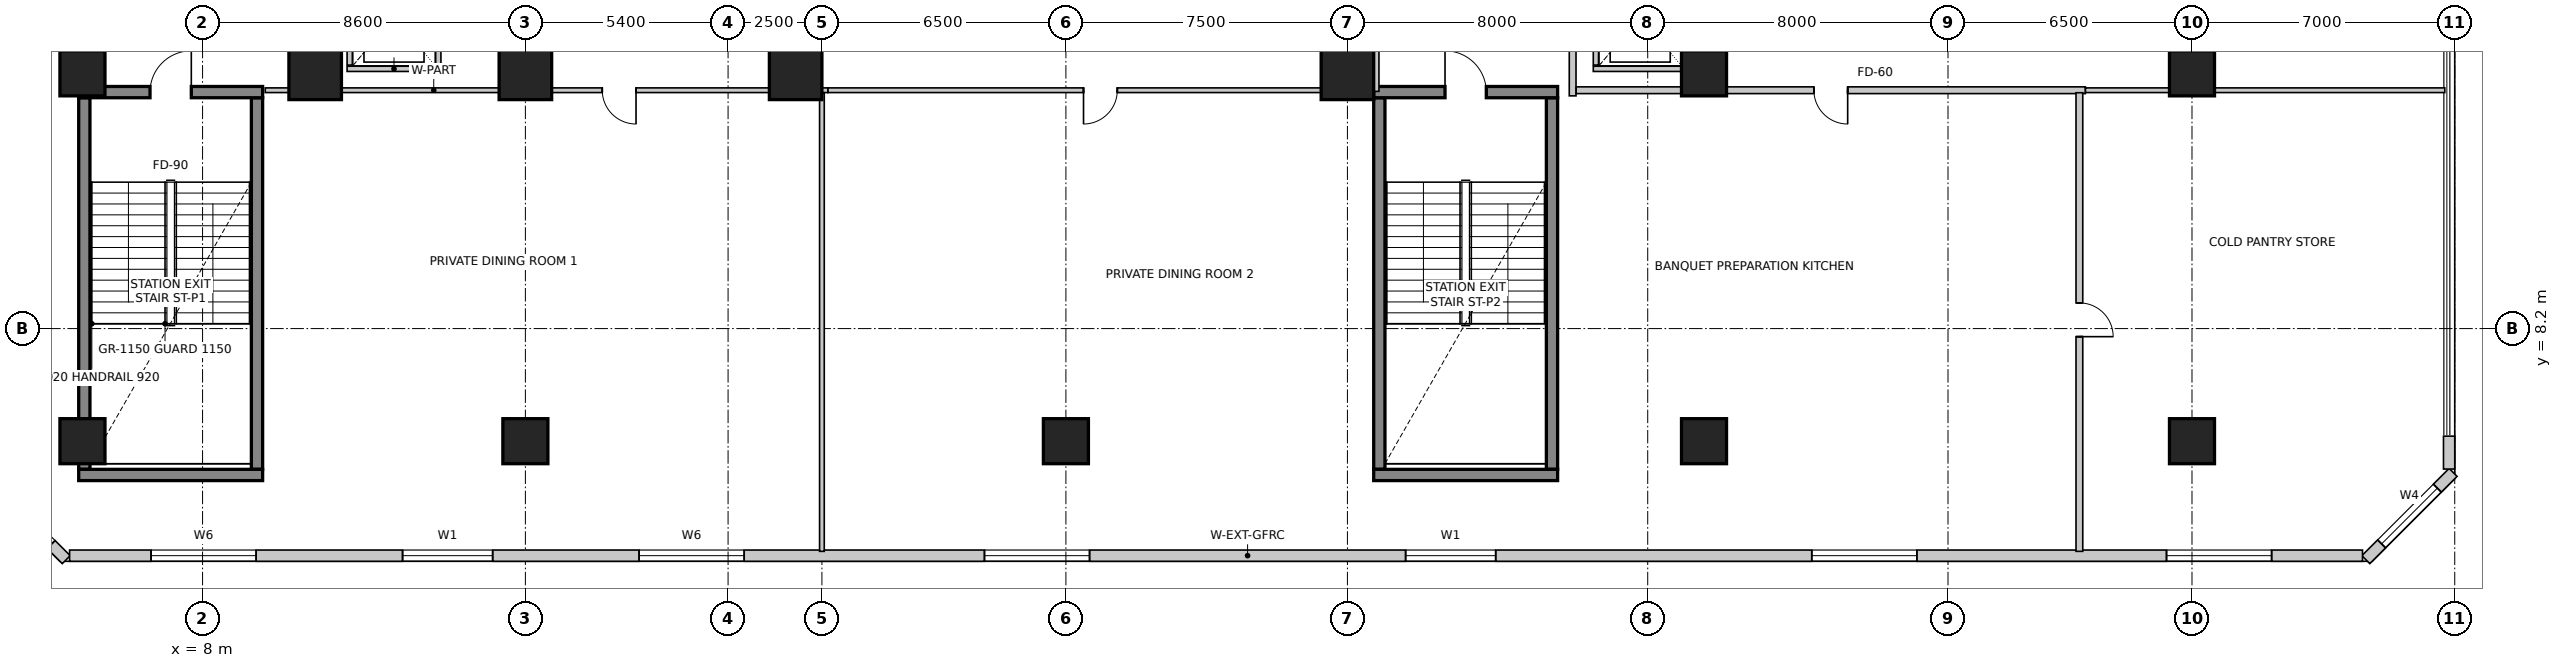
"""IFC4 building model, lengths in metres.
Left out: names, types, materials, properties, quantities, classifications, styles, units other than length and angle.
Written with IfcOpenShell. Run it as: python <this file> out.ifc"""

import sys

from ifc_helpers import new_model, si_unit, direction, frame, frame_2d, origin, origin_2d, place, context, subcontext, project, spatial, rectangle, extrude, source, transform, mapped, element, fill, save


model = new_model("IFC4")
c1 = context("Model", 3, precision=1e-05, world=origin(), true_north=direction((0.0, 1.0)))
c2 = subcontext(c1, "Body", "Model", "MODEL_VIEW")
j1 = project(units=[si_unit("LENGTHUNIT", "METRE"), si_unit("PLANEANGLEUNIT", "RADIAN")], contexts=[c1])
p1 = place(None, origin())
s1 = spatial("IfcSite", under=j1, at=p1, CompositionType="ELEMENT")
p2 = place(p1, origin())
s2 = spatial("IfcBuilding", under=s1, at=p2, CompositionType="ELEMENT")
p3 = place(p2, frame((0.0, 0.0, 16.4)))
s3 = spatial("IfcBuildingStorey", under=s2, at=p3, CompositionType="ELEMENT", Elevation=16.4)
for number, where, z_axis, x_axis in (
    (1, (4.85, 4.45, 0.0), (0.0, 0.0, 1.0), (0.0, 1.0, 0.0)),
    (2, (9.45, 4.45, 0.0), (0.0, 0.0, 1.0), (0.0, 1.0, 0.0)),
):
    element("IfcWall", number, at=place(p3, frame(where, z_axis=z_axis, x_axis=x_axis)), inside=s3, PredefinedType="SHEAR", context=c2, shape_type="SweptSolid", body=[
        extrude(rectangle(XDim=9.9, YDim=0.3, at=frame_2d((4.95, 0.0))), origin(), (0.0, 0.0, 1.0), 5.2),
    ])
p4 = place(p3, frame((4.7, 4.3, 0.0), z_axis=(0.0, 0.0, 1.0), x_axis=(1.0, 0.0, 0.0)))
e3 = element("IfcWall", 3, at=p4, inside=s3, PredefinedType="SHEAR", context=c2, shape_type="SweptSolid", body=[
    extrude(rectangle(XDim=4.9, YDim=0.3, at=frame_2d((2.45, 0.0))), origin(), (0.0, 0.0, 1.0), 5.2),
])
p5 = place(p3, frame((4.7, 14.5, 0.0), z_axis=(0.0, 0.0, 1.0), x_axis=(1.0, 0.0, 0.0)))
e4 = element("IfcWall", 4, at=p5, inside=s3, PredefinedType="SHEAR", context=c2, shape_type="SweptSolid", body=[
    extrude(rectangle(XDim=4.9, YDim=0.3, at=frame_2d((2.45, 0.0))), origin(), (0.0, 0.0, 1.0), 5.2),
])
m1 = source(origin(), c2, "Body", "SweptSolid", [
    extrude(rectangle(XDim=1.1, YDim=2.15, at=frame_2d((0.55, 1.075))), frame((0.0, 0.16, 0.0), z_axis=(0.0, -1.0, 0.0), x_axis=(1.0, 0.0, 0.0)), (0.0, 0.0, 1.0), 0.32),
])
p6 = place(p5, frame((1.9, 0.0, 0.0)))
e5 = element("IfcOpeningElement", 5, at=p6, cuts=e4, PredefinedType="OPENING", context=c2, shape_type="MappedRepresentation", body=[
    mapped(m1, transform((0.0, 0.0, 0.0), scale=1.0)),
])
for number, where, z_axis, x_axis in (
    (6, (39.35, 4.45, 0.0), (0.0, 0.0, 1.0), (0.0, 1.0, 0.0)),
    (7, (43.95, 4.45, 0.0), (0.0, 0.0, 1.0), (0.0, 1.0, 0.0)),
):
    element("IfcWall", number, at=place(p3, frame(where, z_axis=z_axis, x_axis=x_axis)), inside=s3, PredefinedType="SHEAR", context=c2, shape_type="SweptSolid", body=[
        extrude(rectangle(XDim=9.9, YDim=0.3, at=frame_2d((4.95, 0.0))), origin(), (0.0, 0.0, 1.0), 5.2),
    ])
p7 = place(p3, frame((39.2, 4.3, 0.0), z_axis=(0.0, 0.0, 1.0), x_axis=(1.0, 0.0, 0.0)))
e8 = element("IfcWall", 8, at=p7, inside=s3, PredefinedType="SHEAR", context=c2, shape_type="SweptSolid", body=[
    extrude(rectangle(XDim=4.9, YDim=0.3, at=frame_2d((2.45, 0.0))), origin(), (0.0, 0.0, 1.0), 5.2),
])
p8 = place(p3, frame((39.2, 14.5, 0.0), z_axis=(0.0, 0.0, 1.0), x_axis=(1.0, 0.0, 0.0)))
e9 = element("IfcWall", 9, at=p8, inside=s3, PredefinedType="SHEAR", context=c2, shape_type="SweptSolid", body=[
    extrude(rectangle(XDim=4.9, YDim=0.3, at=frame_2d((2.45, 0.0))), origin(), (0.0, 0.0, 1.0), 5.2),
])
p9 = place(p8, frame((1.9, 0.0, 0.0)))
e10 = element("IfcOpeningElement", 10, at=p9, cuts=e9, PredefinedType="OPENING", context=c2, shape_type="MappedRepresentation", body=[
    mapped(m1, transform((0.0, 0.0, 0.0), scale=1.0)),
])
m2 = source(origin(), c2, "Body", "SweptSolid", [
    extrude(rectangle(XDim=1.2, YDim=1.2, at=origin_2d()), origin(), (0.0, 0.0, 1.0), 5.2),
])
for number, where, z_axis, x_axis in (
    (11, (4.8, 5.2, 0.0), (0.0, 0.0, 1.0), (1.0, 0.0, 0.0)),
    (12, (16.6, 5.2, 0.0), (0.0, 0.0, 1.0), (1.0, 0.0, 0.0)),
    (13, (31.0, 5.2, 0.0), (0.0, 0.0, 1.0), (1.0, 0.0, 0.0)),
    (14, (48.0, 5.2, 0.0), (0.0, 0.0, 1.0), (1.0, 0.0, 0.0)),
    (15, (61.0, 5.2, 0.0), (0.0, 0.0, 1.0), (1.0, 0.0, 0.0)),
    (16, (4.8, 15.0, 0.0), (0.0, 0.0, 1.0), (1.0, 0.0, 0.0)),
):
    element("IfcColumn", number, at=place(p3, frame(where, z_axis=z_axis, x_axis=x_axis)), inside=s3, PredefinedType="COLUMN", context=c2, shape_type="MappedRepresentation", body=[
        mapped(m2, transform((0.0, 0.0, 0.0), scale=1.0)),
    ])
m3 = source(origin(), c2, "Body", "SweptSolid", [
    extrude(rectangle(XDim=1.4, YDim=1.4, at=origin_2d()), origin(), (0.0, 0.0, 1.0), 5.2),
])
for number, where, z_axis, x_axis in (
    (17, (11.0, 15.0, 0.0), (0.0, 0.0, 1.0), (1.0, 0.0, 0.0)),
    (18, (16.6, 15.0, 0.0), (0.0, 0.0, 1.0), (1.0, 0.0, 0.0)),
    (19, (23.8, 15.0, 0.0), (0.0, 0.0, 1.0), (1.0, 0.0, 0.0)),
    (20, (38.5, 15.0, 0.0), (0.0, 0.0, 1.0), (1.0, 0.0, 0.0)),
):
    element("IfcColumn", number, at=place(p3, frame(where, z_axis=z_axis, x_axis=x_axis)), inside=s3, PredefinedType="COLUMN", context=c2, shape_type="MappedRepresentation", body=[
        mapped(m3, transform((0.0, 0.0, 0.0), scale=1.0)),
    ])
for number, where, z_axis, x_axis in (
    (21, (48.0, 15.0, 0.0), (0.0, 0.0, 1.0), (1.0, 0.0, 0.0)),
    (22, (61.0, 15.0, 0.0), (0.0, 0.0, 1.0), (1.0, 0.0, 0.0)),
):
    element("IfcColumn", number, at=place(p3, frame(where, z_axis=z_axis, x_axis=x_axis)), inside=s3, PredefinedType="COLUMN", context=c2, shape_type="MappedRepresentation", body=[
        mapped(m2, transform((0.0, 0.0, 0.0), scale=1.0)),
    ])
p10 = place(p3, frame((65.632, 2.044, 0.0), z_axis=(0.0, 0.0, 1.0), x_axis=(0.707106781187, 0.707106781187, 0.0)))
e23 = element("IfcWall", 23, at=p10, inside=s3, PredefinedType="SOLIDWALL", context=c2, shape_type="SweptSolid", body=[
    extrude(rectangle(XDim=3.287, YDim=0.3, at=frame_2d((1.644, 0.0))), origin(), (0.0, 0.0, 1.0), 4.85),
])
m4 = source(origin(), c2, "Body", "SweptSolid", [
    extrude(rectangle(XDim=2.1, YDim=2.0, at=frame_2d((1.05, 1.0))), frame((0.0, 0.16, 0.0), z_axis=(0.0, -1.0, 0.0), x_axis=(1.0, 0.0, 0.0)), (0.0, 0.0, 1.0), 0.32),
])
p11 = place(p10, frame((0.594, 0.0, 0.85)))
e24 = element("IfcOpeningElement", 24, at=p11, cuts=e23, PredefinedType="OPENING", context=c2, shape_type="MappedRepresentation", body=[
    mapped(m4, transform((0.0, 0.0, 0.0), scale=1.0)),
])
p12 = place(p3, frame((67.85, 4.457, 0.0), z_axis=(0.0, 0.0, 1.0), x_axis=(0.0, 1.0, 0.0)))
e25 = element("IfcWall", 25, at=p12, inside=s3, PredefinedType="SOLIDWALL", context=c2, shape_type="SweptSolid", body=[
    extrude(rectangle(XDim=0.877, YDim=0.3, at=frame_2d((0.439, 0.0))), origin(), (0.0, 0.0, 1.0), 4.85),
])
p13 = place(p3, frame((2.288, 4.124, 0.0), z_axis=(0.0, 0.0, 1.0), x_axis=(0.707106781187, -0.707106781187, 0.0)))
e26 = element("IfcWall", 26, at=p13, inside=s3, PredefinedType="SOLIDWALL", context=c2, shape_type="SweptSolid", body=[
    extrude(rectangle(XDim=2.942, YDim=0.3, at=frame_2d((1.471, 0.0))), origin(), (0.0, 0.0, 1.0), 4.85),
])
m5 = source(origin(), c2, "Body", "SweptSolid", [
    extrude(rectangle(XDim=1.8, YDim=2.1, at=frame_2d((0.9, 1.05))), frame((0.0, 0.16, 0.0), z_axis=(0.0, -1.0, 0.0), x_axis=(1.0, 0.0, 0.0)), (0.0, 0.0, 1.0), 0.32),
])
p14 = place(p13, frame((0.571, 0.0, 0.85)))
e27 = element("IfcOpeningElement", 27, at=p14, cuts=e26, PredefinedType="OPENING", context=c2, shape_type="MappedRepresentation", body=[
    mapped(m5, transform((0.0, 0.0, 0.0), scale=1.0)),
])
p15 = place(p3, frame((4.457, 2.15, 0.0), z_axis=(0.0, 0.0, 1.0), x_axis=(1.0, 0.0, 0.0)))
e28 = element("IfcWall", 28, at=p15, inside=s3, PredefinedType="SOLIDWALL", context=c2, shape_type="SweptSolid", body=[
    extrude(rectangle(XDim=61.085, YDim=0.3, at=frame_2d((30.543, 0.0))), origin(), (0.0, 0.0, 1.0), 4.85),
])
m6 = source(origin(), c2, "Body", "SweptSolid", [
    extrude(rectangle(XDim=2.8, YDim=2.4, at=frame_2d((1.4, 1.2))), frame((0.0, 0.16, 0.0), z_axis=(0.0, -1.0, 0.0), x_axis=(1.0, 0.0, 0.0)), (0.0, 0.0, 1.0), 0.32),
])
p16 = place(p15, frame((2.17, 0.0, 0.85)))
e29 = element("IfcOpeningElement", 29, at=p16, cuts=e28, PredefinedType="OPENING", context=c2, shape_type="MappedRepresentation", body=[
    mapped(m6, transform((0.0, 0.0, 0.0), scale=1.0)),
])
m7 = source(origin(), c2, "Body", "SweptSolid", [
    extrude(rectangle(XDim=2.4, YDim=2.2, at=frame_2d((1.2, 1.1))), frame((0.0, 0.16, 0.0), z_axis=(0.0, -1.0, 0.0), x_axis=(1.0, 0.0, 0.0)), (0.0, 0.0, 1.0), 0.32),
])
p17 = place(p15, frame((8.871, 0.0, 0.85)))
e30 = element("IfcOpeningElement", 30, at=p17, cuts=e28, PredefinedType="OPENING", context=c2, shape_type="MappedRepresentation", body=[
    mapped(m7, transform((0.0, 0.0, 0.0), scale=1.0)),
])
p18 = place(p15, frame((15.172, 0.0, 0.85)))
e31 = element("IfcOpeningElement", 31, at=p18, cuts=e28, PredefinedType="OPENING", context=c2, shape_type="MappedRepresentation", body=[
    mapped(m6, transform((0.0, 0.0, 0.0), scale=1.0)),
])
p19 = place(p15, frame((24.373, 0.0, 0.85)))
e32 = element("IfcOpeningElement", 32, at=p19, cuts=e28, PredefinedType="OPENING", context=c2, shape_type="MappedRepresentation", body=[
    mapped(m6, transform((0.0, 0.0, 0.0), scale=1.0)),
])
p20 = place(p15, frame((35.593, 0.0, 0.85)))
e33 = element("IfcOpeningElement", 33, at=p20, cuts=e28, PredefinedType="OPENING", context=c2, shape_type="MappedRepresentation", body=[
    mapped(m7, transform((0.0, 0.0, 0.0), scale=1.0)),
])
p21 = place(p15, frame((46.413, 0.0, 0.85)))
e34 = element("IfcOpeningElement", 34, at=p21, cuts=e28, PredefinedType="OPENING", context=c2, shape_type="MappedRepresentation", body=[
    mapped(m6, transform((0.0, 0.0, 0.0), scale=1.0)),
])
p22 = place(p15, frame((55.864, 0.0, 0.85)))
e35 = element("IfcOpeningElement", 35, at=p22, cuts=e28, PredefinedType="OPENING", context=c2, shape_type="MappedRepresentation", body=[
    mapped(m6, transform((0.0, 0.0, 0.0), scale=1.0)),
])
p23 = place(p3, frame((11.85, 15.12, 0.0), z_axis=(0.0, 0.0, 1.0), x_axis=(1.0, 0.0, 0.0)))
e36 = element("IfcWall", 36, at=p23, inside=s3, PredefinedType="SOLIDWALL", context=c2, shape_type="SweptSolid", body=[
    extrude(rectangle(XDim=2.5, YDim=0.14, at=frame_2d((1.25, 0.0))), origin(), (0.0, 0.0, 1.0), 3.642),
])
for number, where, z_axis, x_axis in (
    (37, (11.92, 15.22, 0.0), (0.0, 0.0, 1.0), (0.0, 1.0, 0.0)),
    (38, (14.28, 15.22, 0.0), (0.0, 0.0, 1.0), (0.0, 1.0, 0.0)),
):
    element("IfcWall", number, at=place(p3, frame(where, z_axis=z_axis, x_axis=x_axis)), inside=s3, PredefinedType="SOLIDWALL", context=c2, shape_type="SweptSolid", body=[
        extrude(rectangle(XDim=2.56, YDim=0.14, at=frame_2d((1.28, 0.0))), origin(), (0.0, 0.0, 1.0), 3.642),
    ])
p24 = place(p3, frame((45.05, 15.12, 0.0), z_axis=(0.0, 0.0, 1.0), x_axis=(1.0, 0.0, 0.0)))
e39 = element("IfcWall", 39, at=p24, inside=s3, PredefinedType="SOLIDWALL", context=c2, shape_type="SweptSolid", body=[
    extrude(rectangle(XDim=2.5, YDim=0.14, at=frame_2d((1.25, 0.0))), origin(), (0.0, 0.0, 1.0), 3.642),
])
p25 = place(p3, frame((45.12, 15.22, 0.0), z_axis=(0.0, 0.0, 1.0), x_axis=(0.0, 1.0, 0.0)))
e40 = element("IfcWall", 40, at=p25, inside=s3, PredefinedType="SOLIDWALL", context=c2, shape_type="SweptSolid", body=[
    extrude(rectangle(XDim=2.56, YDim=0.14, at=frame_2d((1.28, 0.0))), origin(), (0.0, 0.0, 1.0), 3.642),
])
p26 = place(p3, frame((47.48, 15.22, 0.0), z_axis=(0.0, 0.0, 1.0), x_axis=(0.0, 1.0, 0.0)))
e41 = element("IfcWall", 41, at=p26, inside=s3, PredefinedType="SOLIDWALL", context=c2, shape_type="SweptSolid", body=[
    extrude(rectangle(XDim=2.56, YDim=0.14, at=frame_2d((1.28, 0.0))), origin(), (0.0, 0.0, 1.0), 3.042),
])
p27 = place(p3, frame((39.25, 14.52, 0.0), z_axis=(0.0, 0.0, 1.0), x_axis=(0.0, 1.0, 0.0)))
e42 = element("IfcWall", 42, at=p27, inside=s3, PredefinedType="PARTITIONING", context=c2, shape_type="SweptSolid", body=[
    extrude(rectangle(XDim=14.886, YDim=0.18, at=frame_2d((7.443, 0.0))), origin(), (0.0, 0.0, 1.0), 3.642),
])
p28 = place(p3, frame((44.5, 29.406, 0.0), z_axis=(0.0, 0.0, 1.0), x_axis=(0.0, -1.0, 0.0)))
e43 = element("IfcWall", 43, at=p28, inside=s3, PredefinedType="PARTITIONING", context=c2, shape_type="SweptSolid", body=[
    extrude(rectangle(XDim=15.006, YDim=0.18, at=frame_2d((7.503, 0.0))), origin(), (0.0, 0.0, 1.0), 3.642),
])
p29 = place(p3, frame((24.66, 14.55, 0.0), z_axis=(0.0, 0.0, 1.0), x_axis=(-1.0, 0.0, 0.0)))
e44 = element("IfcWall", 44, at=p29, inside=s3, PredefinedType="PARTITIONING", context=c2, shape_type="SweptSolid", body=[
    extrude(rectangle(XDim=14.99, YDim=0.125, at=frame_2d((7.495, 0.0))), origin(), (0.0, 0.0, 1.0), 3.892),
])
m8 = source(origin(), c2, "Body", "SweptSolid", [
    extrude(rectangle(XDim=0.9, YDim=2.15, at=frame_2d((0.45, 1.075))), frame((0.0, 0.073, 0.0), z_axis=(0.0, -1.0, 0.0), x_axis=(1.0, 0.0, 0.0)), (0.0, 0.0, 1.0), 0.145),
])
p30 = place(p29, frame((5.112, 0.0, 0.0)))
e45 = element("IfcOpeningElement", 45, at=p30, cuts=e44, PredefinedType="OPENING", context=c2, shape_type="MappedRepresentation", body=[
    mapped(m8, transform((0.0, 0.0, 0.0), scale=1.0)),
])
p31 = place(p3, frame((39.056, 14.55, 0.0), z_axis=(0.0, 0.0, 1.0), x_axis=(-1.0, 0.0, 0.0)))
e46 = element("IfcWall", 46, at=p31, inside=s3, PredefinedType="PARTITIONING", context=c2, shape_type="SweptSolid", body=[
    extrude(rectangle(XDim=14.394, YDim=0.125, at=frame_2d((7.197, 0.0))), origin(), (0.0, 0.0, 1.0), 4.435),
])
p32 = place(p31, frame((6.687, 0.0, 0.0)))
e47 = element("IfcOpeningElement", 47, at=p32, cuts=e46, PredefinedType="OPENING", context=c2, shape_type="MappedRepresentation", body=[
    mapped(m8, transform((0.0, 0.0, 0.0), scale=1.0)),
])
p33 = place(p3, frame((58.16, 14.55, 0.0), z_axis=(0.0, 0.0, 1.0), x_axis=(-1.0, 0.0, 0.0)))
e48 = element("IfcWall", 48, at=p33, inside=s3, PredefinedType="PARTITIONING", context=c2, shape_type="SweptSolid", body=[
    extrude(rectangle(XDim=13.566, YDim=0.18, at=frame_2d((6.783, 0.0))), origin(), (0.0, 0.0, 1.0), 3.892),
])
m9 = source(origin(), c2, "Body", "SweptSolid", [
    extrude(rectangle(XDim=0.9, YDim=2.15, at=frame_2d((0.45, 1.075))), frame((0.0, 0.1, 0.0), z_axis=(0.0, -1.0, 0.0), x_axis=(1.0, 0.0, 0.0)), (0.0, 0.0, 1.0), 0.2),
])
p34 = place(p33, frame((6.333, 0.0, 0.0)))
e49 = element("IfcOpeningElement", 49, at=p34, cuts=e48, PredefinedType="OPENING", context=c2, shape_type="MappedRepresentation", body=[
    mapped(m9, transform((0.0, 0.0, 0.0), scale=1.0)),
])
p35 = place(p3, frame((67.735, 14.55, 0.0), z_axis=(0.0, 0.0, 1.0), x_axis=(-1.0, 0.0, 0.0)))
e50 = element("IfcWall", 50, at=p35, inside=s3, PredefinedType="PARTITIONING", context=c2, shape_type="SweptSolid", body=[
    extrude(rectangle(XDim=9.573, YDim=0.125, at=frame_2d((4.787, 0.0))), origin(), (0.0, 0.0, 1.0), 3.892),
])
p36 = place(p3, frame((58.0, 14.483, 0.0), z_axis=(0.0, 0.0, 1.0), x_axis=(0.0, -1.0, 0.0)))
e51 = element("IfcWall", 51, at=p36, inside=s3, PredefinedType="PARTITIONING", context=c2, shape_type="SweptSolid", body=[
    extrude(rectangle(XDim=12.219, YDim=0.18, at=frame_2d((6.109, 0.0))), origin(), (0.0, 0.0, 1.0), 3.642),
])
p37 = place(p36, frame((5.599, 0.0, 0.0)))
e52 = element("IfcOpeningElement", 52, at=p37, cuts=e51, PredefinedType="OPENING", context=c2, shape_type="MappedRepresentation", body=[
    mapped(m9, transform((0.0, 0.0, 0.0), scale=1.0)),
])
p38 = place(p3, frame((24.5, 14.483, 0.0), z_axis=(0.0, 0.0, 1.0), x_axis=(0.0, -1.0, 0.0)))
e53 = element("IfcWall", 53, at=p38, inside=s3, PredefinedType="PARTITIONING", context=c2, shape_type="SweptSolid", body=[
    extrude(rectangle(XDim=12.219, YDim=0.125, at=frame_2d((6.109, 0.0))), origin(), (0.0, 0.0, 1.0), 3.642),
])
m10 = source(origin(), c2, "Body", "SweptSolid", [
    extrude(rectangle(XDim=2.1, YDim=2.0, at=frame_2d((1.05, 1.0))), frame((0.0, -0.015, 0.0), z_axis=(0.0, -1.0, 0.0), x_axis=(1.0, 0.0, 0.0)), (0.0, 0.0, 1.0), 0.06),
])
p39 = place(p11, origin())
e54 = element("IfcWindow", 54, at=p39, inside=s3, PartitioningType="SINGLE_PANEL", PredefinedType="WINDOW", context=c2, shape_type="MappedRepresentation", body=[
    mapped(m10, transform((0.0, 0.0, 0.0), scale=1.0)),
])
fill(e24, e54)
m11 = source(origin(), c2, "Body", "SweptSolid", [
    extrude(rectangle(XDim=2.8, YDim=2.4, at=frame_2d((1.4, 1.2))), frame((0.0, -0.015, 0.0), z_axis=(0.0, -1.0, 0.0), x_axis=(1.0, 0.0, 0.0)), (0.0, 0.0, 1.0), 0.06),
])
p40 = place(p16, origin())
e55 = element("IfcWindow", 55, at=p40, inside=s3, PartitioningType="SINGLE_PANEL", PredefinedType="WINDOW", context=c2, shape_type="MappedRepresentation", body=[
    mapped(m11, transform((0.0, 0.0, 0.0), scale=1.0)),
])
fill(e29, e55)
m12 = source(origin(), c2, "Body", "SweptSolid", [
    extrude(rectangle(XDim=2.4, YDim=2.2, at=frame_2d((1.2, 1.1))), frame((0.0, -0.015, 0.0), z_axis=(0.0, -1.0, 0.0), x_axis=(1.0, 0.0, 0.0)), (0.0, 0.0, 1.0), 0.06),
])
p41 = place(p17, origin())
e56 = element("IfcWindow", 56, at=p41, inside=s3, PartitioningType="SINGLE_PANEL", PredefinedType="WINDOW", context=c2, shape_type="MappedRepresentation", body=[
    mapped(m12, transform((0.0, 0.0, 0.0), scale=1.0)),
])
fill(e30, e56)
p42 = place(p18, origin())
e57 = element("IfcWindow", 57, at=p42, inside=s3, PartitioningType="SINGLE_PANEL", PredefinedType="WINDOW", context=c2, shape_type="MappedRepresentation", body=[
    mapped(m11, transform((0.0, 0.0, 0.0), scale=1.0)),
])
fill(e31, e57)
p43 = place(p19, origin())
e58 = element("IfcWindow", 58, at=p43, inside=s3, PartitioningType="SINGLE_PANEL", PredefinedType="WINDOW", context=c2, shape_type="MappedRepresentation", body=[
    mapped(m11, transform((0.0, 0.0, 0.0), scale=1.0)),
])
fill(e32, e58)
p44 = place(p20, origin())
e59 = element("IfcWindow", 59, at=p44, inside=s3, PartitioningType="SINGLE_PANEL", PredefinedType="WINDOW", context=c2, shape_type="MappedRepresentation", body=[
    mapped(m12, transform((0.0, 0.0, 0.0), scale=1.0)),
])
fill(e33, e59)
p45 = place(p21, origin())
e60 = element("IfcWindow", 60, at=p45, inside=s3, PartitioningType="SINGLE_PANEL", PredefinedType="WINDOW", context=c2, shape_type="MappedRepresentation", body=[
    mapped(m11, transform((0.0, 0.0, 0.0), scale=1.0)),
])
fill(e34, e60)
p46 = place(p22, origin())
e61 = element("IfcWindow", 61, at=p46, inside=s3, PartitioningType="SINGLE_PANEL", PredefinedType="WINDOW", context=c2, shape_type="MappedRepresentation", body=[
    mapped(m11, transform((0.0, 0.0, 0.0), scale=1.0)),
])
fill(e35, e61)
m13 = source(origin(), c2, "Body", "SweptSolid", [
    extrude(rectangle(XDim=1.1, YDim=2.15, at=frame_2d((0.55, 1.075))), frame((0.0, 0.025, 0.0), z_axis=(0.0, -1.0, 0.0), x_axis=(1.0, 0.0, 0.0)), (0.0, 0.0, 1.0), 0.05),
])
p47 = place(p6, origin())
e62 = element("IfcDoor", 62, at=p47, inside=s3, OperationType="SINGLE_SWING_RIGHT", PredefinedType="DOOR", context=c2, shape_type="MappedRepresentation", body=[
    mapped(m13, transform((0.0, 0.0, 0.0), scale=1.0)),
])
fill(e5, e62)
p48 = place(p9, origin())
e63 = element("IfcDoor", 63, at=p48, inside=s3, OperationType="SINGLE_SWING_LEFT", PredefinedType="DOOR", context=c2, shape_type="MappedRepresentation", body=[
    mapped(m13, transform((0.0, 0.0, 0.0), scale=1.0)),
])
fill(e10, e63)
m14 = source(origin(), c2, "Body", "SweptSolid", [
    extrude(rectangle(XDim=0.9, YDim=2.15, at=frame_2d((0.45, 1.075))), frame((0.0, 0.025, 0.0), z_axis=(0.0, -1.0, 0.0), x_axis=(1.0, 0.0, 0.0)), (0.0, 0.0, 1.0), 0.05),
])
p49 = place(p34, origin())
e64 = element("IfcDoor", 64, at=p49, inside=s3, OperationType="SINGLE_SWING_LEFT", PredefinedType="DOOR", context=c2, shape_type="MappedRepresentation", body=[
    mapped(m14, transform((0.0, 0.0, 0.0), scale=1.0)),
])
fill(e49, e64)
p50 = place(p37, origin())
e65 = element("IfcDoor", 65, at=p50, inside=s3, OperationType="SINGLE_SWING_RIGHT", PredefinedType="DOOR", context=c2, shape_type="MappedRepresentation", body=[
    mapped(m14, transform((0.0, 0.0, 0.0), scale=1.0)),
])
fill(e52, e65)
m15 = source(origin(), c2, "Body", "SweptSolid", [
    extrude(rectangle(XDim=0.9, YDim=2.15, at=frame_2d((0.45, 1.075))), frame((0.0, 0.025, 0.0), z_axis=(0.0, -1.0, 0.0), x_axis=(1.0, 0.0, 0.0)), (0.0, 0.0, 1.0), 0.05),
])
p51 = place(p30, origin())
e66 = element("IfcDoor", 66, at=p51, inside=s3, OperationType="SINGLE_SWING_LEFT", PredefinedType="DOOR", context=c2, shape_type="MappedRepresentation", body=[
    mapped(m15, transform((0.0, 0.0, 0.0), scale=1.0)),
])
fill(e45, e66)
p52 = place(p32, origin())
e67 = element("IfcDoor", 67, at=p52, inside=s3, OperationType="SINGLE_SWING_RIGHT", PredefinedType="DOOR", context=c2, shape_type="MappedRepresentation", body=[
    mapped(m15, transform((0.0, 0.0, 0.0), scale=1.0)),
])
fill(e47, e67)
save(model, sys.argv[1])
